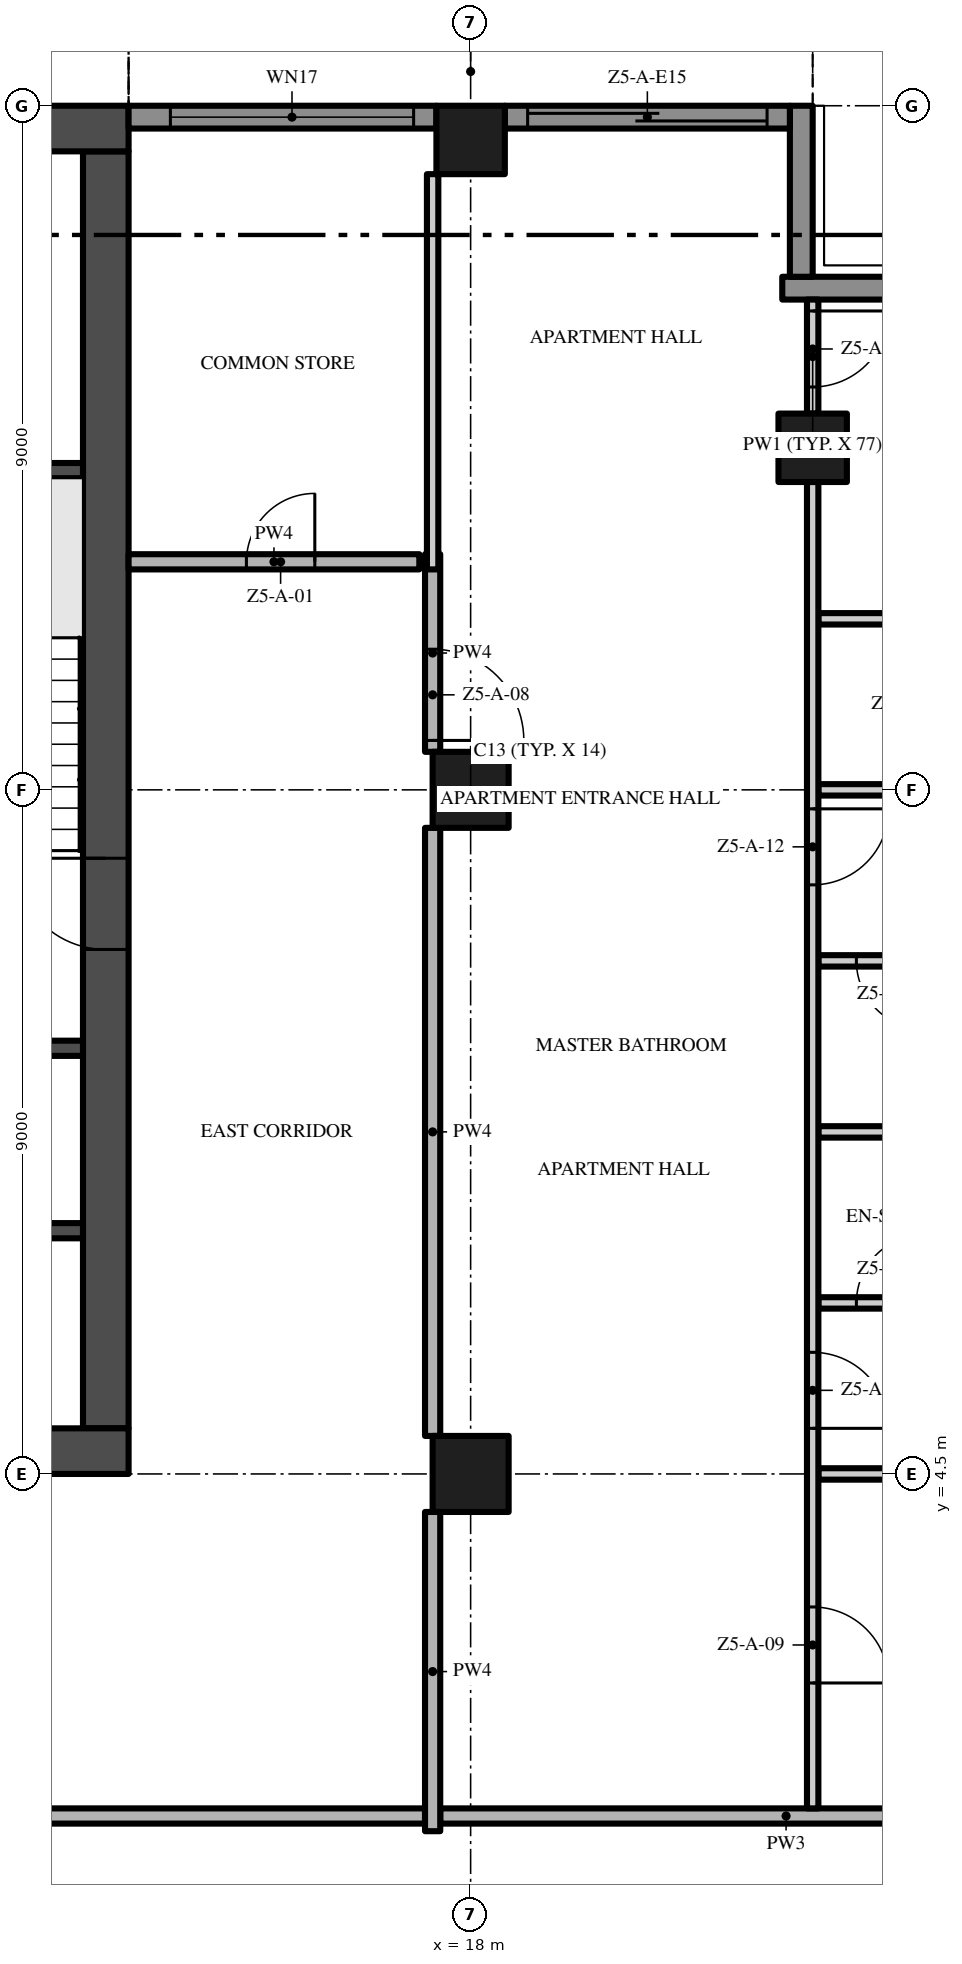
"""IFC4 building model, lengths in metres.
Left out: names, types, materials, properties, quantities, classifications, styles, units other than length and angle.
Written with IfcOpenShell. Run it as: python <this file> out.ifc"""

import sys

from ifc_helpers import new_model, si_unit, direction, frame, frame_2d, origin, origin_2d, place, context, subcontext, project, spatial, rectangle, extrude, element, fill, save


model = new_model("IFC4")
c1 = context("Model", 3, precision=1e-05, world=origin(), true_north=direction((0.0, 1.0)))
c2 = subcontext(c1, "Body", "Model", "MODEL_VIEW")
j1 = project(units=[si_unit("LENGTHUNIT", "METRE"), si_unit("PLANEANGLEUNIT", "RADIAN")], contexts=[c1])
p1 = place(None, origin())
s1 = spatial("IfcSite", under=j1, at=p1, CompositionType="ELEMENT")
p2 = place(p1, origin())
s2 = spatial("IfcBuilding", under=s1, at=p2, CompositionType="ELEMENT")
p3 = place(p2, frame((0.0, 0.0, 242.6)))
s3 = spatial("IfcBuildingStorey", under=s2, at=p3, CompositionType="ELEMENT", Elevation=242.6)
p4 = place(p3, frame((-13.5, 4.8, -0.3), z_axis=(0.0, 0.0, 1.0), x_axis=(1.0, 0.0, 0.0)))
e1 = element("IfcWall", 1, at=p4, inside=s3, PredefinedType="SHEAR", context=c2, shape_type="SweptSolid", body=[
    extrude(rectangle(XDim=27.0, YDim=0.6, at=frame_2d((13.5, 0.0))), origin(), (0.0, 0.0, 1.0), 3.8),
])
p5 = place(p4, frame((12.0, 0.0, 0.3)))
e2 = element("IfcOpeningElement", 2, at=p5, cuts=e1, PredefinedType="OPENING", context=c2, shape_type="SweptSolid", body=[
    extrude(rectangle(XDim=3.0, YDim=2.4, at=frame_2d((1.5, 1.2))), frame((0.0, 0.31, 0.0), z_axis=(0.0, -1.0, 0.0), x_axis=(1.0, 0.0, 0.0)), (0.0, 0.0, 1.0), 0.62),
])
p6 = place(p4, frame((4.9, 0.0, 0.3)))
e3 = element("IfcOpeningElement", 3, at=p6, cuts=e1, PredefinedType="OPENING", context=c2, shape_type="SweptSolid", body=[
    extrude(rectangle(XDim=1.2, YDim=2.2, at=frame_2d((0.6, 1.1))), frame((0.0, 0.31, 0.0), z_axis=(0.0, -1.0, 0.0), x_axis=(1.0, 0.0, 0.0)), (0.0, 0.0, 1.0), 0.62),
])
p7 = place(p4, frame((20.75, 0.0, 0.3)))
e4 = element("IfcOpeningElement", 4, at=p7, cuts=e1, PredefinedType="OPENING", context=c2, shape_type="SweptSolid", body=[
    extrude(rectangle(XDim=1.5, YDim=2.2, at=frame_2d((0.75, 1.1))), frame((0.0, 0.31, 0.0), z_axis=(0.0, -1.0, 0.0), x_axis=(1.0, 0.0, 0.0)), (0.0, 0.0, 1.0), 0.62),
])
p8 = place(p4, frame((17.4, 0.0, 0.3)))
e5 = element("IfcOpeningElement", 5, at=p8, cuts=e1, PredefinedType="OPENING", context=c2, shape_type="SweptSolid", body=[
    extrude(rectangle(XDim=1.2, YDim=2.2, at=frame_2d((0.6, 1.1))), frame((0.0, 0.31, 0.0), z_axis=(0.0, -1.0, 0.0), x_axis=(1.0, 0.0, 0.0)), (0.0, 0.0, 1.0), 0.62),
])
p9 = place(p3, frame((13.2, 5.1, -0.3), z_axis=(0.0, 0.0, 1.0), x_axis=(0.0, 1.0, 0.0)))
e6 = element("IfcWall", 6, at=p9, inside=s3, PredefinedType="SHEAR", context=c2, shape_type="SweptSolid", body=[
    extrude(rectangle(XDim=16.8, YDim=0.6, at=frame_2d((8.4, 0.0))), origin(), (0.0, 0.0, 1.0), 3.8),
])
p10 = place(p9, frame((6.3, 0.0, 0.3)))
e7 = element("IfcOpeningElement", 7, at=p10, cuts=e6, PredefinedType="OPENING", context=c2, shape_type="SweptSolid", body=[
    extrude(rectangle(XDim=1.2, YDim=2.2, at=frame_2d((0.6, 1.1))), frame((0.0, 0.31, 0.0), z_axis=(0.0, -1.0, 0.0), x_axis=(1.0, 0.0, 0.0)), (0.0, 0.0, 1.0), 0.62),
])
p11 = place(p3, frame((13.5, 22.2, -0.3), z_axis=(0.0, 0.0, 1.0), x_axis=(-1.0, 0.0, 0.0)))
e8 = element("IfcWall", 8, at=p11, inside=s3, PredefinedType="SHEAR", context=c2, shape_type="SweptSolid", body=[
    extrude(rectangle(XDim=27.0, YDim=0.6, at=frame_2d((13.5, 0.0))), origin(), (0.0, 0.0, 1.0), 3.8),
])
p12 = place(p3, frame((18.0, 13.5, 0.0), z_axis=(0.0, 0.0, 1.0), x_axis=(1.0, 0.0, 0.0)))
e9 = element("IfcColumn", 9, at=p12, inside=s3, PredefinedType="COLUMN", context=c2, shape_type="SweptSolid", body=[
    extrude(rectangle(XDim=1.0, YDim=1.0, at=origin_2d()), origin(), (0.0, 0.0, 1.0), 3.5),
])
p13 = place(p3, frame((18.0, 22.05, 0.0), z_axis=(0.0, 0.0, 1.0), x_axis=(1.0, 0.0, 0.0)))
e10 = element("IfcColumn", 10, at=p13, inside=s3, PredefinedType="COLUMN", context=c2, shape_type="SweptSolid", body=[
    extrude(rectangle(XDim=0.9, YDim=0.9, at=origin_2d()), origin(), (0.0, 0.0, 1.0), 3.5),
])
p14 = place(p3, frame((18.0, 4.5, 0.0), z_axis=(0.0, 0.0, 1.0), x_axis=(1.0, 0.0, 0.0)))
e11 = element("IfcColumn", 11, at=p14, inside=s3, PredefinedType="COLUMN", context=c2, shape_type="SweptSolid", body=[
    extrude(rectangle(XDim=1.0, YDim=1.0, at=origin_2d()), origin(), (0.0, 0.0, 1.0), 3.5),
])
p15 = place(p3, frame((22.5, 18.0, 0.0), z_axis=(0.0, 0.0, 1.0), x_axis=(1.0, 0.0, 0.0)))
e12 = element("IfcColumn", 12, at=p15, inside=s3, PredefinedType="COLUMN", context=c2, shape_type="SweptSolid", body=[
    extrude(rectangle(XDim=0.9, YDim=0.9, at=origin_2d()), origin(), (0.0, 0.0, 1.0), 3.5),
])
p16 = place(p3, frame((22.1, 20.1, 0.0), z_axis=(0.0, 0.0, 1.0), x_axis=(1.0, 0.0, 0.0)))
e13 = element("IfcWall", 13, at=p16, inside=s3, PredefinedType="SOLIDWALL", context=c2, shape_type="SweptSolid", body=[
    extrude(rectangle(XDim=2.35, YDim=0.3, at=frame_2d((1.175, 0.0))), origin(), (0.0, 0.0, 1.0), 3.5),
])
p17 = place(p3, frame((22.35, 22.5, 0.0), z_axis=(0.0, 0.0, 1.0), x_axis=(0.0, -1.0, 0.0)))
e14 = element("IfcWall", 14, at=p17, inside=s3, PredefinedType="SOLIDWALL", context=c2, shape_type="SweptSolid", body=[
    extrude(rectangle(XDim=2.25, YDim=0.3, at=frame_2d((1.125, 0.0))), origin(), (0.0, 0.0, 1.0), 3.5),
])
p18 = place(p3, frame((18.45, 22.35, 0.0), z_axis=(0.0, 0.0, 1.0), x_axis=(1.0, 0.0, 0.0)))
e15 = element("IfcWall", 15, at=p18, inside=s3, PredefinedType="SOLIDWALL", context=c2, shape_type="SweptSolid", body=[
    extrude(rectangle(XDim=3.75, YDim=0.3, at=frame_2d((1.875, 0.0))), origin(), (0.0, 0.0, 1.0), 3.5),
])
p19 = place(p18, frame((0.3, 0.0, 0.0)))
e16 = element("IfcOpeningElement", 16, at=p19, cuts=e15, PredefinedType="OPENING", context=c2, shape_type="SweptSolid", body=[
    extrude(rectangle(XDim=3.15, YDim=2.4, at=frame_2d((1.575, 1.2))), frame((0.0, 0.16, 0.0), z_axis=(0.0, -1.0, 0.0), x_axis=(1.0, 0.0, 0.0)), (0.0, 0.0, 1.0), 0.32),
])
p20 = place(p3, frame((13.5, 22.35, 0.0), z_axis=(0.0, 0.0, 1.0), x_axis=(1.0, 0.0, 0.0)))
e17 = element("IfcWall", 17, at=p20, inside=s3, PredefinedType="SOLIDWALL", context=c2, shape_type="SweptSolid", body=[
    extrude(rectangle(XDim=4.05, YDim=0.3, at=frame_2d((2.025, 0.0))), origin(), (0.0, 0.0, 1.0), 3.5),
])
p21 = place(p20, frame((0.55, 0.0, 0.45)))
e18 = element("IfcOpeningElement", 18, at=p21, cuts=e17, PredefinedType="OPENING", context=c2, shape_type="SweptSolid", body=[
    extrude(rectangle(XDim=3.2, YDim=2.65, at=frame_2d((1.6, 1.325))), frame((0.0, 0.16, 0.0), z_axis=(0.0, -1.0, 0.0), x_axis=(1.0, 0.0, 0.0)), (0.0, 0.0, 1.0), 0.32),
])
for number, where, z_axis, x_axis in (
    (19, (9.65, 7.7, 0.0), (0.0, 0.0, 1.0), (1.0, 0.0, 0.0)),
    (20, (9.65, 10.1, 0.0), (0.0, 0.0, 1.0), (1.0, 0.0, 0.0)),
    (21, (9.65, 17.7, 0.0), (0.0, 0.0, 1.0), (1.0, 0.0, 0.0)),
):
    element("IfcWall", number, at=place(p3, frame(where, z_axis=z_axis, x_axis=x_axis)), inside=s3, PredefinedType="SHEAR", context=c2, shape_type="SweptSolid", body=[
        extrude(rectangle(XDim=3.25, YDim=0.2, at=frame_2d((1.625, 0.0))), origin(), (0.0, 0.0, 1.0), 3.5),
    ])
p22 = place(p3, frame((17.4, 0.0, 0.0), z_axis=(0.0, 0.0, 1.0), x_axis=(-1.0, 0.0, 0.0)))
e22 = element("IfcWall", 22, at=p22, inside=s3, PredefinedType="PARTITIONING", context=c2, shape_type="SweptSolid", body=[
    extrude(rectangle(XDim=34.8, YDim=0.2, at=frame_2d((17.4, 0.0))), origin(), (0.0, 0.0, 1.0), 3.5),
])
p23 = place(p22, frame((25.65, 0.0, 0.0)))
e23 = element("IfcOpeningElement", 23, at=p23, cuts=e22, PredefinedType="OPENING", context=c2, shape_type="SweptSolid", body=[
    extrude(rectangle(XDim=1.5, YDim=2.4, at=frame_2d((0.75, 1.2))), frame((0.0, 0.11, 0.0), z_axis=(0.0, -1.0, 0.0), x_axis=(1.0, 0.0, 0.0)), (0.0, 0.0, 1.0), 0.22),
])
p24 = place(p22, frame((7.65, 0.0, 0.0)))
e24 = element("IfcOpeningElement", 24, at=p24, cuts=e22, PredefinedType="OPENING", context=c2, shape_type="SweptSolid", body=[
    extrude(rectangle(XDim=1.5, YDim=2.4, at=frame_2d((0.75, 1.2))), frame((0.0, 0.11, 0.0), z_axis=(0.0, -1.0, 0.0), x_axis=(1.0, 0.0, 0.0)), (0.0, 0.0, 1.0), 0.22),
])
p25 = place(p3, frame((17.6, 0.0, 0.0), z_axis=(0.0, 0.0, 1.0), x_axis=(1.0, 0.0, 0.0)))
e25 = element("IfcWall", 25, at=p25, inside=s3, PredefinedType="PARTITIONING", context=c2, shape_type="SweptSolid", body=[
    extrude(rectangle(XDim=9.1, YDim=0.2, at=frame_2d((4.55, 0.0))), origin(), (0.0, 0.0, 1.0), 3.5),
])
p26 = place(p3, frame((22.575, 4.5, 0.0), z_axis=(0.0, 0.0, 1.0), x_axis=(1.0, 0.0, 0.0)))
e26 = element("IfcWall", 26, at=p26, inside=s3, PredefinedType="PARTITIONING", context=c2, shape_type="SweptSolid", body=[
    extrude(rectangle(XDim=3.525, YDim=0.15, at=frame_2d((1.762, 0.0))), origin(), (0.0, 0.0, 1.0), 3.5),
])
p27 = place(p3, frame((22.575, 6.75, 0.0), z_axis=(0.0, 0.0, 1.0), x_axis=(1.0, 0.0, 0.0)))
e27 = element("IfcWall", 27, at=p27, inside=s3, PredefinedType="PARTITIONING", context=c2, shape_type="SweptSolid", body=[
    extrude(rectangle(XDim=1.875, YDim=0.15, at=frame_2d((0.938, 0.0))), origin(), (0.0, 0.0, 1.0), 3.5),
])
p28 = place(p27, frame((0.5, 0.0, 0.0)))
e28 = element("IfcOpeningElement", 28, at=p28, cuts=e27, PredefinedType="OPENING", context=c2, shape_type="SweptSolid", body=[
    extrude(rectangle(XDim=0.9, YDim=2.1, at=frame_2d((0.45, 1.05))), frame((0.0, 0.085, 0.0), z_axis=(0.0, -1.0, 0.0), x_axis=(1.0, 0.0, 0.0)), (0.0, 0.0, 1.0), 0.17),
])
p29 = place(p3, frame((22.575, 9.0, 0.0), z_axis=(0.0, 0.0, 1.0), x_axis=(1.0, 0.0, 0.0)))
e29 = element("IfcWall", 29, at=p29, inside=s3, PredefinedType="PARTITIONING", context=c2, shape_type="SweptSolid", body=[
    extrude(rectangle(XDim=1.875, YDim=0.15, at=frame_2d((0.938, 0.0))), origin(), (0.0, 0.0, 1.0), 3.5),
])
p30 = place(p3, frame((24.45, 11.25, 0.0), z_axis=(0.0, 0.0, 1.0), x_axis=(-1.0, 0.0, 0.0)))
e30 = element("IfcWall", 30, at=p30, inside=s3, PredefinedType="PARTITIONING", context=c2, shape_type="SweptSolid", body=[
    extrude(rectangle(XDim=1.875, YDim=0.15, at=frame_2d((0.938, 0.0))), origin(), (0.0, 0.0, 1.0), 3.5),
])
p31 = place(p30, frame((0.475, 0.0, 0.0)))
e31 = element("IfcOpeningElement", 31, at=p31, cuts=e30, PredefinedType="OPENING", context=c2, shape_type="SweptSolid", body=[
    extrude(rectangle(XDim=0.9, YDim=2.1, at=frame_2d((0.45, 1.05))), frame((0.0, 0.085, 0.0), z_axis=(0.0, -1.0, 0.0), x_axis=(1.0, 0.0, 0.0)), (0.0, 0.0, 1.0), 0.17),
])
p32 = place(p3, frame((22.575, 13.5, 0.0), z_axis=(0.0, 0.0, 1.0), x_axis=(1.0, 0.0, 0.0)))
e32 = element("IfcWall", 32, at=p32, inside=s3, PredefinedType="PARTITIONING", context=c2, shape_type="SweptSolid", body=[
    extrude(rectangle(XDim=3.525, YDim=0.15, at=frame_2d((1.762, 0.0))), origin(), (0.0, 0.0, 1.0), 3.5),
])
p33 = place(p3, frame((22.575, 15.75, 0.0), z_axis=(0.0, 0.0, 1.0), x_axis=(1.0, 0.0, 0.0)))
e33 = element("IfcWall", 33, at=p33, inside=s3, PredefinedType="PARTITIONING", context=c2, shape_type="SweptSolid", body=[
    extrude(rectangle(XDim=1.875, YDim=0.15, at=frame_2d((0.938, 0.0))), origin(), (0.0, 0.0, 1.0), 3.5),
])
p34 = place(p3, frame((13.5, 16.5, 0.0), z_axis=(0.0, 0.0, 1.0), x_axis=(1.0, 0.0, 0.0)))
e34 = element("IfcWall", 34, at=p34, inside=s3, PredefinedType="PARTITIONING", context=c2, shape_type="SweptSolid", body=[
    extrude(rectangle(XDim=3.825, YDim=0.2, at=frame_2d((1.913, 0.0))), origin(), (0.0, 0.0, 1.0), 3.5),
])
p35 = place(p34, frame((1.55, 0.0, 0.0)))
e35 = element("IfcOpeningElement", 35, at=p35, cuts=e34, PredefinedType="OPENING", context=c2, shape_type="SweptSolid", body=[
    extrude(rectangle(XDim=0.9, YDim=2.1, at=frame_2d((0.45, 1.05))), frame((0.0, 0.11, 0.0), z_axis=(0.0, -1.0, 0.0), x_axis=(1.0, 0.0, 0.0)), (0.0, 0.0, 1.0), 0.22),
])
p36 = place(p3, frame((17.5, -0.2, 0.0), z_axis=(0.0, 0.0, 1.0), x_axis=(0.0, 1.0, 0.0)))
e36 = element("IfcWall", 36, at=p36, inside=s3, PredefinedType="PARTITIONING", context=c2, shape_type="SweptSolid", body=[
    extrude(rectangle(XDim=4.2, YDim=0.2, at=frame_2d((2.1, 0.0))), origin(), (0.0, 0.0, 1.0), 3.5),
])
p37 = place(p3, frame((17.5, 5.0, 0.0), z_axis=(0.0, 0.0, 1.0), x_axis=(0.0, 1.0, 0.0)))
e37 = element("IfcWall", 37, at=p37, inside=s3, PredefinedType="PARTITIONING", context=c2, shape_type="SweptSolid", body=[
    extrude(rectangle(XDim=8.0, YDim=0.2, at=frame_2d((4.0, 0.0))), origin(), (0.0, 0.0, 1.0), 3.5),
])
p38 = place(p3, frame((17.5, 16.6, 0.0), z_axis=(0.0, 0.0, 1.0), x_axis=(0.0, -1.0, 0.0)))
e38 = element("IfcWall", 38, at=p38, inside=s3, PredefinedType="PARTITIONING", context=c2, shape_type="SweptSolid", body=[
    extrude(rectangle(XDim=2.6, YDim=0.2, at=frame_2d((1.3, 0.0))), origin(), (0.0, 0.0, 1.0), 3.5),
])
p39 = place(p38, frame((1.25, 0.0, 0.0)))
e39 = element("IfcOpeningElement", 39, at=p39, cuts=e38, PredefinedType="OPENING", context=c2, shape_type="SweptSolid", body=[
    extrude(rectangle(XDim=1.2, YDim=2.4, at=frame_2d((0.6, 1.2))), frame((0.0, 0.11, 0.0), z_axis=(0.0, -1.0, 0.0), x_axis=(1.0, 0.0, 0.0)), (0.0, 0.0, 1.0), 0.22),
])
p40 = place(p3, frame((17.5, 16.4, 0.0), z_axis=(0.0, 0.0, 1.0), x_axis=(0.0, 1.0, 0.0)))
e40 = element("IfcWall", 40, at=p40, inside=s3, PredefinedType="PARTITIONING", context=c2, shape_type="SweptSolid", body=[
    extrude(rectangle(XDim=5.2, YDim=0.15, at=frame_2d((2.6, 0.0))), origin(), (0.0, 0.0, 1.0), 3.5),
])
p41 = place(p3, frame((22.5, 17.55, 0.0), z_axis=(0.0, 0.0, 1.0), x_axis=(0.0, -1.0, 0.0)))
e41 = element("IfcWall", 41, at=p41, inside=s3, PredefinedType="PARTITIONING", context=c2, shape_type="SweptSolid", body=[
    extrude(rectangle(XDim=17.45, YDim=0.15, at=frame_2d((8.725, 0.0))), origin(), (0.0, 0.0, 1.0), 3.5),
])
p42 = place(p41, frame((14.8, 0.0, 0.0)))
e42 = element("IfcOpeningElement", 42, at=p42, cuts=e41, PredefinedType="OPENING", context=c2, shape_type="SweptSolid", body=[
    extrude(rectangle(XDim=1.0, YDim=2.4, at=frame_2d((0.5, 1.2))), frame((0.0, 0.085, 0.0), z_axis=(0.0, -1.0, 0.0), x_axis=(1.0, 0.0, 0.0)), (0.0, 0.0, 1.0), 0.17),
])
p43 = place(p41, frame((11.45, 0.0, 0.0)))
e43 = element("IfcOpeningElement", 43, at=p43, cuts=e41, PredefinedType="OPENING", context=c2, shape_type="SweptSolid", body=[
    extrude(rectangle(XDim=1.0, YDim=2.4, at=frame_2d((0.5, 1.2))), frame((0.0, 0.085, 0.0), z_axis=(0.0, -1.0, 0.0), x_axis=(1.0, 0.0, 0.0)), (0.0, 0.0, 1.0), 0.17),
])
p44 = place(p41, frame((4.3, 0.0, 0.0)))
e44 = element("IfcOpeningElement", 44, at=p44, cuts=e41, PredefinedType="OPENING", context=c2, shape_type="SweptSolid", body=[
    extrude(rectangle(XDim=1.0, YDim=2.4, at=frame_2d((0.5, 1.2))), frame((0.0, 0.085, 0.0), z_axis=(0.0, -1.0, 0.0), x_axis=(1.0, 0.0, 0.0)), (0.0, 0.0, 1.0), 0.17),
])
p45 = place(p3, frame((22.5, 19.95, 0.0), z_axis=(0.0, 0.0, 1.0), x_axis=(0.0, -1.0, 0.0)))
e45 = element("IfcWall", 45, at=p45, inside=s3, PredefinedType="PARTITIONING", context=c2, shape_type="SweptSolid", body=[
    extrude(rectangle(XDim=1.5, YDim=0.15, at=frame_2d((0.75, 0.0))), origin(), (0.0, 0.0, 1.0), 3.5),
])
p46 = place(p45, frame((0.15, 0.0, 0.0)))
e46 = element("IfcOpeningElement", 46, at=p46, cuts=e45, PredefinedType="OPENING", context=c2, shape_type="SweptSolid", body=[
    extrude(rectangle(XDim=1.0, YDim=2.4, at=frame_2d((0.5, 1.2))), frame((0.0, 0.085, 0.0), z_axis=(0.0, -1.0, 0.0), x_axis=(1.0, 0.0, 0.0)), (0.0, 0.0, 1.0), 0.17),
])
p47 = place(p19, origin())
e47 = element("IfcDoor", 47, at=p47, inside=s3, OperationType="SINGLE_SWING_LEFT", PredefinedType="DOOR", context=c2, shape_type="SweptSolid", body=[
    extrude(rectangle(XDim=3.15, YDim=2.4, at=frame_2d((1.575, 1.2))), frame((0.0, 0.025, 0.0), z_axis=(0.0, -1.0, 0.0), x_axis=(1.0, 0.0, 0.0)), (0.0, 0.0, 1.0), 0.05),
])
fill(e16, e47)
p48 = place(p21, origin())
e48 = element("IfcWindow", 48, at=p48, inside=s3, PartitioningType="SINGLE_PANEL", PredefinedType="WINDOW", context=c2, shape_type="SweptSolid", body=[
    extrude(rectangle(XDim=3.2, YDim=2.65, at=frame_2d((1.6, 1.325))), frame((0.0, 0.03, 0.0), z_axis=(0.0, -1.0, 0.0), x_axis=(1.0, 0.0, 0.0)), (0.0, 0.0, 1.0), 0.06),
])
fill(e18, e48)
p49 = place(p10, frame((1.2, 0.0, 0.0), z_axis=(0.0, 0.0, 1.0), x_axis=(-1.0, 0.0, 0.0)))
e49 = element("IfcDoor", 49, at=p49, inside=s3, OperationType="SINGLE_SWING_LEFT", PredefinedType="DOOR", context=c2, shape_type="SweptSolid", body=[
    extrude(rectangle(XDim=1.2, YDim=2.2, at=frame_2d((0.6, 1.1))), frame((0.0, 0.025, 0.0), z_axis=(0.0, -1.0, 0.0), x_axis=(1.0, 0.0, 0.0)), (0.0, 0.0, 1.0), 0.05),
])
fill(e7, e49)
p50 = place(p35, origin())
e50 = element("IfcDoor", 50, at=p50, inside=s3, OperationType="SINGLE_SWING_RIGHT", PredefinedType="DOOR", context=c2, shape_type="SweptSolid", body=[
    extrude(rectangle(XDim=0.9, YDim=2.1, at=frame_2d((0.45, 1.05))), frame((0.0, 0.025, 0.0), z_axis=(0.0, -1.0, 0.0), x_axis=(1.0, 0.0, 0.0)), (0.0, 0.0, 1.0), 0.05),
])
fill(e35, e50)
p51 = place(p39, origin())
e51 = element("IfcDoor", 51, at=p51, inside=s3, OperationType="SINGLE_SWING_RIGHT", PredefinedType="DOOR", context=c2, shape_type="SweptSolid", body=[
    extrude(rectangle(XDim=1.2, YDim=2.4, at=frame_2d((0.6, 1.2))), frame((0.0, 0.025, 0.0), z_axis=(0.0, -1.0, 0.0), x_axis=(1.0, 0.0, 0.0)), (0.0, 0.0, 1.0), 0.05),
])
fill(e39, e51)
p52 = place(p42, origin())
e52 = element("IfcDoor", 52, at=p52, inside=s3, OperationType="SINGLE_SWING_RIGHT", PredefinedType="DOOR", context=c2, shape_type="SweptSolid", body=[
    extrude(rectangle(XDim=1.0, YDim=2.4, at=frame_2d((0.5, 1.2))), frame((0.0, 0.025, 0.0), z_axis=(0.0, -1.0, 0.0), x_axis=(1.0, 0.0, 0.0)), (0.0, 0.0, 1.0), 0.05),
])
fill(e42, e52)
p53 = place(p43, origin())
e53 = element("IfcDoor", 53, at=p53, inside=s3, OperationType="SINGLE_SWING_RIGHT", PredefinedType="DOOR", context=c2, shape_type="SweptSolid", body=[
    extrude(rectangle(XDim=1.0, YDim=2.4, at=frame_2d((0.5, 1.2))), frame((0.0, 0.025, 0.0), z_axis=(0.0, -1.0, 0.0), x_axis=(1.0, 0.0, 0.0)), (0.0, 0.0, 1.0), 0.05),
])
fill(e43, e53)
p54 = place(p28, origin())
e54 = element("IfcDoor", 54, at=p54, inside=s3, OperationType="SINGLE_SWING_RIGHT", PredefinedType="DOOR", context=c2, shape_type="SweptSolid", body=[
    extrude(rectangle(XDim=0.9, YDim=2.1, at=frame_2d((0.45, 1.05))), frame((0.0, 0.025, 0.0), z_axis=(0.0, -1.0, 0.0), x_axis=(1.0, 0.0, 0.0)), (0.0, 0.0, 1.0), 0.05),
])
fill(e28, e54)
p55 = place(p44, origin())
e55 = element("IfcDoor", 55, at=p55, inside=s3, OperationType="SINGLE_SWING_LEFT", PredefinedType="DOOR", context=c2, shape_type="SweptSolid", body=[
    extrude(rectangle(XDim=1.0, YDim=2.4, at=frame_2d((0.5, 1.2))), frame((0.0, 0.025, 0.0), z_axis=(0.0, -1.0, 0.0), x_axis=(1.0, 0.0, 0.0)), (0.0, 0.0, 1.0), 0.05),
])
fill(e44, e55)
p56 = place(p31, origin())
e56 = element("IfcDoor", 56, at=p56, inside=s3, OperationType="SINGLE_SWING_LEFT", PredefinedType="DOOR", context=c2, shape_type="SweptSolid", body=[
    extrude(rectangle(XDim=0.9, YDim=2.1, at=frame_2d((0.45, 1.05))), frame((0.0, 0.025, 0.0), z_axis=(0.0, -1.0, 0.0), x_axis=(1.0, 0.0, 0.0)), (0.0, 0.0, 1.0), 0.05),
])
fill(e31, e56)
p57 = place(p46, origin())
e57 = element("IfcDoor", 57, at=p57, inside=s3, OperationType="SINGLE_SWING_LEFT", PredefinedType="DOOR", context=c2, shape_type="SweptSolid", body=[
    extrude(rectangle(XDim=1.0, YDim=2.4, at=frame_2d((0.5, 1.2))), frame((0.0, 0.025, 0.0), z_axis=(0.0, -1.0, 0.0), x_axis=(1.0, 0.0, 0.0)), (0.0, 0.0, 1.0), 0.05),
])
fill(e46, e57)
save(model, sys.argv[1])
